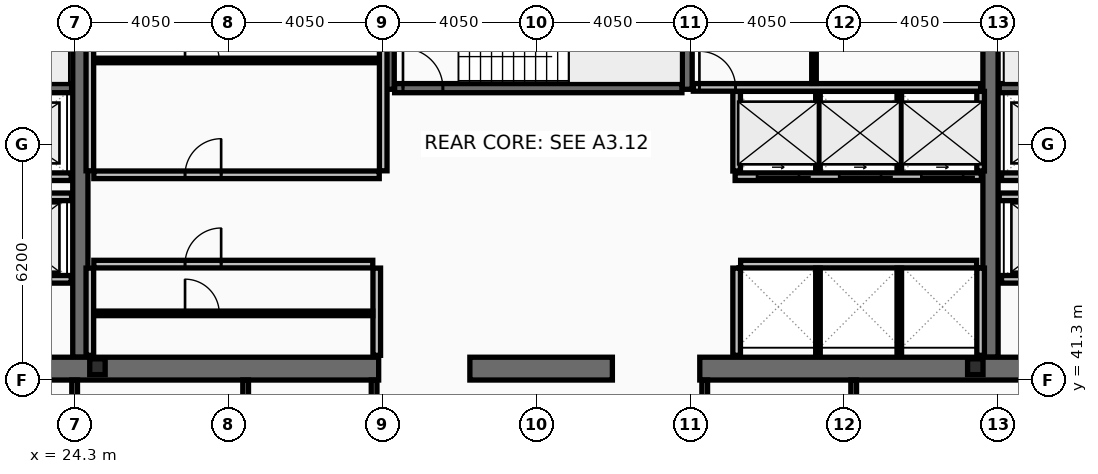
"""IFC4 building model, lengths in metres.
Left out: names, types, materials, properties, quantities, classifications, styles, units other than length and angle.
Written with IfcOpenShell. Run it as: python <this file> out.ifc"""

import sys

from ifc_helpers import new_model, si_unit, direction, frame, frame_2d, origin, origin_2d, place, context, subcontext, project, spatial, rectangle, i_section, extrude, element, fill, save


model = new_model("IFC4")
c1 = context("Model", 3, precision=1e-05, world=origin(), true_north=direction((0.0, 1.0)))
c2 = subcontext(c1, "Body", "Model", "MODEL_VIEW")
j1 = project(units=[si_unit("LENGTHUNIT", "METRE"), si_unit("PLANEANGLEUNIT", "RADIAN")], contexts=[c1])
p1 = place(None, origin())
s1 = spatial("IfcSite", under=j1, at=p1, CompositionType="ELEMENT")
p2 = place(p1, origin())
s2 = spatial("IfcBuilding", under=s1, at=p2, CompositionType="ELEMENT")
p3 = place(p2, frame((0.0, 0.0, 192.2)))
s3 = spatial("IfcBuildingStorey", under=s2, at=p3, CompositionType="ELEMENT", Elevation=192.2)
for number, where, z_axis, x_axis in (
    (1, (24.45, 41.9, 0.0), (0.0, 0.0, 1.0), (0.0, 1.0, 0.0)),
    (2, (48.4, 41.9, 0.0), (0.0, 0.0, 1.0), (0.0, 1.0, 0.0)),
):
    element("IfcWall", number, at=place(p3, frame(where, z_axis=z_axis, x_axis=x_axis)), inside=s3, PredefinedType="SHEAR", context=c2, shape_type="SweptSolid", body=[
        extrude(rectangle(XDim=11.2, YDim=0.4, at=frame_2d((5.6, 0.0))), origin(), (0.0, 0.0, 1.0), 3.44),
    ])
p4 = place(p3, frame((32.3, 41.6, 0.0), z_axis=(0.0, 0.0, 1.0), x_axis=(-1.0, 0.0, 0.0)))
e3 = element("IfcWall", 3, at=p4, inside=s3, PredefinedType="SHEAR", context=c2, shape_type="SweptSolid", body=[
    extrude(rectangle(XDim=11.45, YDim=0.6, at=frame_2d((5.725, 0.0))), origin(), (0.0, 0.0, 1.0), 3.44),
])
p5 = place(p3, frame((38.45, 41.6, 0.0), z_axis=(0.0, 0.0, 1.0), x_axis=(-1.0, 0.0, 0.0)))
e4 = element("IfcWall", 4, at=p5, inside=s3, PredefinedType="SHEAR", context=c2, shape_type="SweptSolid", body=[
    extrude(rectangle(XDim=3.75, YDim=0.6, at=frame_2d((1.875, 0.0))), origin(), (0.0, 0.0, 1.0), 3.44),
])
p6 = place(p3, frame((52.05, 41.6, 0.0), z_axis=(0.0, 0.0, 1.0), x_axis=(-1.0, 0.0, 0.0)))
e5 = element("IfcWall", 5, at=p6, inside=s3, PredefinedType="SHEAR", context=c2, shape_type="SweptSolid", body=[
    extrude(rectangle(XDim=11.3, YDim=0.6, at=frame_2d((5.65, 0.0))), origin(), (0.0, 0.0, 1.0), 3.44),
])
for number, where, z_axis, x_axis in (
    (6, (32.58, 48.95, 0.0), (0.0, 0.0, 1.0), (0.0, 1.0, 0.0)),
    (7, (40.42, 48.95, 0.0), (0.0, 0.0, 1.0), (0.0, 1.0, 0.0)),
):
    element("IfcWall", number, at=place(p3, frame(where, z_axis=z_axis, x_axis=x_axis)), inside=s3, PredefinedType="SHEAR", context=c2, shape_type="SweptSolid", body=[
        extrude(rectangle(XDim=4.15, YDim=0.26, at=frame_2d((2.075, 0.0))), origin(), (0.0, 0.0, 1.0), 3.44),
    ])
p7 = place(p3, frame((16.8, 48.98, 0.0), z_axis=(0.0, 0.0, 1.0), x_axis=(1.0, 0.0, 0.0)))
e8 = element("IfcWall", 8, at=p7, inside=s3, PredefinedType="SHEAR", context=c2, shape_type="SweptSolid", body=[
    extrude(rectangle(XDim=7.42, YDim=0.24, at=frame_2d((3.71, 0.0))), origin(), (0.0, 0.0, 1.0), 3.44),
])
p8 = place(p7, frame((0.22, 0.0, 0.0)))
e9 = element("IfcOpeningElement", 9, at=p8, cuts=e8, PredefinedType="OPENING", context=c2, shape_type="SweptSolid", body=[
    extrude(rectangle(XDim=1.05, YDim=2.15, at=frame_2d((0.525, 1.075))), frame((0.0, 0.13, 0.0), z_axis=(0.0, -1.0, 0.0), x_axis=(1.0, 0.0, 0.0)), (0.0, 0.0, 1.0), 0.26),
])
p9 = place(p3, frame((48.63, 48.98, 0.0), z_axis=(0.0, 0.0, 1.0), x_axis=(1.0, 0.0, 0.0)))
e10 = element("IfcWall", 10, at=p9, inside=s3, PredefinedType="SHEAR", context=c2, shape_type="SweptSolid", body=[
    extrude(rectangle(XDim=7.47, YDim=0.24, at=frame_2d((3.735, 0.0))), origin(), (0.0, 0.0, 1.0), 3.44),
])
p10 = place(p9, frame((6.2, 0.0, 0.0)))
e11 = element("IfcOpeningElement", 11, at=p10, cuts=e10, PredefinedType="OPENING", context=c2, shape_type="SweptSolid", body=[
    extrude(rectangle(XDim=1.05, YDim=2.15, at=frame_2d((0.525, 1.075))), frame((0.0, 0.13, 0.0), z_axis=(0.0, -1.0, 0.0), x_axis=(1.0, 0.0, 0.0)), (0.0, 0.0, 1.0), 0.26),
])
p11 = place(p3, frame((32.72, 48.98, 0.0), z_axis=(0.0, 0.0, 1.0), x_axis=(1.0, 0.0, 0.0)))
e12 = element("IfcWall", 12, at=p11, inside=s3, PredefinedType="SHEAR", context=c2, shape_type="SweptSolid", body=[
    extrude(rectangle(XDim=7.56, YDim=0.24, at=frame_2d((3.78, 0.0))), origin(), (0.0, 0.0, 1.0), 3.44),
])
p12 = place(p11, frame((0.22, 0.0, 0.0)))
e13 = element("IfcOpeningElement", 13, at=p12, cuts=e12, PredefinedType="OPENING", context=c2, shape_type="SweptSolid", body=[
    extrude(rectangle(XDim=1.05, YDim=2.15, at=frame_2d((0.525, 1.075))), frame((0.0, 0.13, 0.0), z_axis=(0.0, -1.0, 0.0), x_axis=(1.0, 0.0, 0.0)), (0.0, 0.0, 1.0), 0.26),
])
for number, where, z_axis, x_axis in (
    (14, (24.9, 41.65, 0.0), (0.0, 0.0, 1.0), (1.0, 0.0, 0.0)),
    (15, (48.0, 41.65, 0.0), (0.0, 0.0, 1.0), (1.0, 0.0, 0.0)),
):
    element("IfcColumn", number, at=place(p3, frame(where, z_axis=z_axis, x_axis=x_axis)), inside=s3, PredefinedType="COLUMN", context=c2, shape_type="SweptSolid", body=[
        extrude(i_section(OverallWidth=0.406, OverallDepth=0.416, WebThickness=0.03, FlangeThickness=0.048, at=origin_2d()), origin(), (0.0, 0.0, 1.0), 3.6),
    ])
p13 = place(p3, frame((51.61, 43.95, 0.0), z_axis=(0.0, 0.0, 1.0), x_axis=(-1.0, 0.0, 0.0)))
e16 = element("IfcWall", 16, at=p13, inside=s3, PredefinedType="PARTITIONING", context=c2, shape_type="SweptSolid", body=[
    extrude(rectangle(XDim=2.92, YDim=0.2, at=frame_2d((1.46, 0.0))), origin(), (0.0, 0.0, 1.0), 3.44),
])
p14 = place(p13, frame((0.81, 0.0, 0.0)))
e17 = element("IfcOpeningElement", 17, at=p14, cuts=e16, PredefinedType="OPENING", context=c2, shape_type="SweptSolid", body=[
    extrude(rectangle(XDim=1.3, YDim=2.18, at=frame_2d((0.65, 1.09))), frame((0.0, 0.11, 0.0), z_axis=(0.0, -1.0, 0.0), x_axis=(1.0, 0.0, 0.0)), (0.0, 0.0, 1.0), 0.22),
])
p15 = place(p3, frame((24.21, 43.95, 0.0), z_axis=(0.0, 0.0, 1.0), x_axis=(-1.0, 0.0, 0.0)))
e18 = element("IfcWall", 18, at=p15, inside=s3, PredefinedType="PARTITIONING", context=c2, shape_type="SweptSolid", body=[
    extrude(rectangle(XDim=2.97, YDim=0.2, at=frame_2d((1.485, 0.0))), origin(), (0.0, 0.0, 1.0), 3.44),
])
p16 = place(p15, frame((0.86, 0.0, 0.0)))
e19 = element("IfcOpeningElement", 19, at=p16, cuts=e18, PredefinedType="OPENING", context=c2, shape_type="SweptSolid", body=[
    extrude(rectangle(XDim=1.3, YDim=2.18, at=frame_2d((0.65, 1.09))), frame((0.0, 0.11, 0.0), z_axis=(0.0, -1.0, 0.0), x_axis=(1.0, 0.0, 0.0)), (0.0, 0.0, 1.0), 0.22),
])
p17 = place(p3, frame((51.61, 46.65, 0.0), z_axis=(0.0, 0.0, 1.0), x_axis=(-1.0, 0.0, 0.0)))
e20 = element("IfcWall", 20, at=p17, inside=s3, PredefinedType="PARTITIONING", context=c2, shape_type="SweptSolid", body=[
    extrude(rectangle(XDim=2.92, YDim=0.2, at=frame_2d((1.46, 0.0))), origin(), (0.0, 0.0, 1.0), 3.44),
])
p18 = place(p17, frame((0.86, 0.0, 0.0)))
e21 = element("IfcOpeningElement", 21, at=p18, cuts=e20, PredefinedType="OPENING", context=c2, shape_type="SweptSolid", body=[
    extrude(rectangle(XDim=1.2, YDim=2.18, at=frame_2d((0.6, 1.09))), frame((0.0, 0.11, 0.0), z_axis=(0.0, -1.0, 0.0), x_axis=(1.0, 0.0, 0.0)), (0.0, 0.0, 1.0), 0.22),
])
p19 = place(p3, frame((24.21, 46.65, 0.0), z_axis=(0.0, 0.0, 1.0), x_axis=(-1.0, 0.0, 0.0)))
e22 = element("IfcWall", 22, at=p19, inside=s3, PredefinedType="PARTITIONING", context=c2, shape_type="SweptSolid", body=[
    extrude(rectangle(XDim=2.97, YDim=0.2, at=frame_2d((1.485, 0.0))), origin(), (0.0, 0.0, 1.0), 3.44),
])
p20 = place(p19, frame((0.91, 0.0, 0.0)))
e23 = element("IfcOpeningElement", 23, at=p20, cuts=e22, PredefinedType="OPENING", context=c2, shape_type="SweptSolid", body=[
    extrude(rectangle(XDim=1.2, YDim=2.18, at=frame_2d((0.6, 1.09))), frame((0.0, 0.11, 0.0), z_axis=(0.0, -1.0, 0.0), x_axis=(1.0, 0.0, 0.0)), (0.0, 0.0, 1.0), 0.22),
])
p21 = place(p3, frame((48.16, 46.65, 0.0), z_axis=(0.0, 0.0, 1.0), x_axis=(-1.0, 0.0, 0.0)))
e24 = element("IfcWall", 24, at=p21, inside=s3, PredefinedType="PARTITIONING", context=c2, shape_type="SweptSolid", body=[
    extrude(rectangle(XDim=6.48, YDim=0.2, at=frame_2d((3.24, 0.0))), origin(), (0.0, 0.0, 1.0), 3.44),
])
p22 = place(p21, frame((4.8, 0.0, 0.0)))
e25 = element("IfcOpeningElement", 25, at=p22, cuts=e24, PredefinedType="OPENING", context=c2, shape_type="SweptSolid", body=[
    extrude(rectangle(XDim=1.1, YDim=2.18, at=frame_2d((0.55, 1.09))), frame((0.0, 0.11, 0.0), z_axis=(0.0, -1.0, 0.0), x_axis=(1.0, 0.0, 0.0)), (0.0, 0.0, 1.0), 0.22),
])
p23 = place(p21, frame((2.64, 0.0, 0.0)))
e26 = element("IfcOpeningElement", 26, at=p23, cuts=e24, PredefinedType="OPENING", context=c2, shape_type="SweptSolid", body=[
    extrude(rectangle(XDim=1.1, YDim=2.18, at=frame_2d((0.55, 1.09))), frame((0.0, 0.11, 0.0), z_axis=(0.0, -1.0, 0.0), x_axis=(1.0, 0.0, 0.0)), (0.0, 0.0, 1.0), 0.22),
])
p24 = place(p21, frame((0.48, 0.0, 0.0)))
e27 = element("IfcOpeningElement", 27, at=p24, cuts=e24, PredefinedType="OPENING", context=c2, shape_type="SweptSolid", body=[
    extrude(rectangle(XDim=1.1, YDim=2.18, at=frame_2d((0.55, 1.09))), frame((0.0, 0.11, 0.0), z_axis=(0.0, -1.0, 0.0), x_axis=(1.0, 0.0, 0.0)), (0.0, 0.0, 1.0), 0.22),
])
p25 = place(p3, frame((21.2, 46.12, 0.0), z_axis=(0.0, 0.0, 1.0), x_axis=(1.0, 0.0, 0.0)))
e28 = element("IfcWall", 28, at=p25, inside=s3, PredefinedType="PARTITIONING", context=c2, shape_type="SweptSolid", body=[
    extrude(rectangle(XDim=3.02, YDim=0.2, at=frame_2d((1.51, 0.0))), origin(), (0.0, 0.0, 1.0), 3.44),
])
p26 = place(p3, frame((48.63, 46.12, 0.0), z_axis=(0.0, 0.0, 1.0), x_axis=(1.0, 0.0, 0.0)))
e29 = element("IfcWall", 29, at=p26, inside=s3, PredefinedType="PARTITIONING", context=c2, shape_type="SweptSolid", body=[
    extrude(rectangle(XDim=3.07, YDim=0.2, at=frame_2d((1.535, 0.0))), origin(), (0.0, 0.0, 1.0), 3.44),
])
for number, where, z_axis, x_axis in (
    (30, (24.7, 46.805, 0.0), (0.0, 0.0, 1.0), (0.0, 1.0, 0.0)),
    (31, (32.42, 46.805, 0.0), (0.0, 0.0, 1.0), (0.0, 1.0, 0.0)),
):
    element("IfcWall", number, at=place(p3, frame(where, z_axis=z_axis, x_axis=x_axis)), inside=s3, PredefinedType="PARTITIONING", context=c2, shape_type="SweptSolid", body=[
        extrude(rectangle(XDim=5.99, YDim=0.2, at=frame_2d((2.995, 0.0))), origin(), (0.0, 0.0, 1.0), 3.44),
    ])
p27 = place(p3, frame((24.805, 49.709, 0.0), z_axis=(0.0, 0.0, 1.0), x_axis=(1.0, 0.0, 0.0)))
e32 = element("IfcWall", 32, at=p27, inside=s3, PredefinedType="PARTITIONING", context=c2, shape_type="SweptSolid", body=[
    extrude(rectangle(XDim=7.51, YDim=0.12, at=frame_2d((3.755, 0.0))), origin(), (0.0, 0.0, 1.0), 3.44),
])
p28 = place(p27, frame((2.4, 0.0, 0.0)))
e33 = element("IfcOpeningElement", 33, at=p28, cuts=e32, PredefinedType="OPENING", context=c2, shape_type="SweptSolid", body=[
    extrude(rectangle(XDim=0.9, YDim=2.05, at=frame_2d((0.45, 1.025))), frame((0.0, 0.07, 0.0), z_axis=(0.0, -1.0, 0.0), x_axis=(1.0, 0.0, 0.0)), (0.0, 0.0, 1.0), 0.14),
])
p29 = place(p3, frame((24.805, 46.7, 0.0), z_axis=(0.0, 0.0, 1.0), x_axis=(1.0, 0.0, 0.0)))
e34 = element("IfcWall", 34, at=p29, inside=s3, PredefinedType="PARTITIONING", context=c2, shape_type="SweptSolid", body=[
    extrude(rectangle(XDim=7.51, YDim=0.2, at=frame_2d((3.755, 0.0))), origin(), (0.0, 0.0, 1.0), 3.44),
])
p30 = place(p29, frame((2.4, 0.0, 0.0)))
e35 = element("IfcOpeningElement", 35, at=p30, cuts=e34, PredefinedType="OPENING", context=c2, shape_type="SweptSolid", body=[
    extrude(rectangle(XDim=0.95, YDim=2.1, at=frame_2d((0.475, 1.05))), frame((0.0, 0.11, 0.0), z_axis=(0.0, -1.0, 0.0), x_axis=(1.0, 0.0, 0.0)), (0.0, 0.0, 1.0), 0.22),
])
for number, where, z_axis, x_axis in (
    (36, (24.7, 41.95, 0.0), (0.0, 0.0, 1.0), (0.0, 1.0, 0.0)),
    (37, (32.25, 41.95, 0.0), (0.0, 0.0, 1.0), (0.0, 1.0, 0.0)),
):
    element("IfcWall", number, at=place(p3, frame(where, z_axis=z_axis, x_axis=x_axis)), inside=s3, PredefinedType="PARTITIONING", context=c2, shape_type="SweptSolid", body=[
        extrude(rectangle(XDim=2.295, YDim=0.2, at=frame_2d((1.147, 0.0))), origin(), (0.0, 0.0, 1.0), 3.44),
    ])
p31 = place(p3, frame((24.805, 43.054, 0.0), z_axis=(0.0, 0.0, 1.0), x_axis=(1.0, 0.0, 0.0)))
e38 = element("IfcWall", 38, at=p31, inside=s3, PredefinedType="PARTITIONING", context=c2, shape_type="SweptSolid", body=[
    extrude(rectangle(XDim=7.34, YDim=0.12, at=frame_2d((3.67, 0.0))), origin(), (0.0, 0.0, 1.0), 3.44),
])
p32 = place(p31, frame((2.4, 0.0, 0.0)))
e39 = element("IfcOpeningElement", 39, at=p32, cuts=e38, PredefinedType="OPENING", context=c2, shape_type="SweptSolid", body=[
    extrude(rectangle(XDim=0.9, YDim=2.05, at=frame_2d((0.45, 1.025))), frame((0.0, 0.07, 0.0), z_axis=(0.0, -1.0, 0.0), x_axis=(1.0, 0.0, 0.0)), (0.0, 0.0, 1.0), 0.14),
])
p33 = place(p3, frame((24.805, 44.35, 0.0), z_axis=(0.0, 0.0, 1.0), x_axis=(1.0, 0.0, 0.0)))
e40 = element("IfcWall", 40, at=p33, inside=s3, PredefinedType="PARTITIONING", context=c2, shape_type="SweptSolid", body=[
    extrude(rectangle(XDim=7.34, YDim=0.2, at=frame_2d((3.67, 0.0))), origin(), (0.0, 0.0, 1.0), 3.44),
])
p34 = place(p33, frame((2.4, 0.0, 0.0)))
e41 = element("IfcOpeningElement", 41, at=p34, cuts=e40, PredefinedType="OPENING", context=c2, shape_type="SweptSolid", body=[
    extrude(rectangle(XDim=0.95, YDim=2.1, at=frame_2d((0.475, 1.05))), frame((0.0, 0.11, 0.0), z_axis=(0.0, -1.0, 0.0), x_axis=(1.0, 0.0, 0.0)), (0.0, 0.0, 1.0), 0.22),
])
for number, where, z_axis, x_axis in (
    (42, (41.72, 46.8, 0.0), (0.0, 0.0, 1.0), (0.0, 1.0, 0.0)),
    (43, (48.14, 46.8, 0.0), (0.0, 0.0, 1.0), (0.0, 1.0, 0.0)),
):
    element("IfcWall", number, at=place(p3, frame(where, z_axis=z_axis, x_axis=x_axis)), inside=s3, PredefinedType="PARTITIONING", context=c2, shape_type="SweptSolid", body=[
        extrude(rectangle(XDim=2.095, YDim=0.2, at=frame_2d((1.047, 0.0))), origin(), (0.0, 0.0, 1.0), 3.44),
    ])
for number, where, z_axis, x_axis in (
    (44, (43.86, 46.8, 0.0), (0.0, 0.0, 1.0), (0.0, 1.0, 0.0)),
    (45, (46.0, 46.8, 0.0), (0.0, 0.0, 1.0), (0.0, 1.0, 0.0)),
):
    element("IfcWall", number, at=place(p3, frame(where, z_axis=z_axis, x_axis=x_axis)), inside=s3, PredefinedType="PARTITIONING", context=c2, shape_type="SweptSolid", body=[
        extrude(rectangle(XDim=2.095, YDim=0.12, at=frame_2d((1.047, 0.0))), origin(), (0.0, 0.0, 1.0), 3.44),
    ])
p35 = place(p3, frame((41.825, 44.35, 0.0), z_axis=(0.0, 0.0, 1.0), x_axis=(1.0, 0.0, 0.0)))
e46 = element("IfcWall", 46, at=p35, inside=s3, PredefinedType="PARTITIONING", context=c2, shape_type="SweptSolid", body=[
    extrude(rectangle(XDim=6.21, YDim=0.2, at=frame_2d((3.105, 0.0))), origin(), (0.0, 0.0, 1.0), 3.44),
])
for number, where, z_axis, x_axis in (
    (47, (41.72, 41.95, 0.0), (0.0, 0.0, 1.0), (0.0, 1.0, 0.0)),
    (48, (48.14, 41.95, 0.0), (0.0, 0.0, 1.0), (0.0, 1.0, 0.0)),
):
    element("IfcWall", number, at=place(p3, frame(where, z_axis=z_axis, x_axis=x_axis)), inside=s3, PredefinedType="PARTITIONING", context=c2, shape_type="SweptSolid", body=[
        extrude(rectangle(XDim=2.295, YDim=0.2, at=frame_2d((1.147, 0.0))), origin(), (0.0, 0.0, 1.0), 3.44),
    ])
for number, where, z_axis, x_axis in (
    (49, (43.86, 41.95, 0.0), (0.0, 0.0, 1.0), (0.0, 1.0, 0.0)),
    (50, (46.0, 41.95, 0.0), (0.0, 0.0, 1.0), (0.0, 1.0, 0.0)),
):
    element("IfcWall", number, at=place(p3, frame(where, z_axis=z_axis, x_axis=x_axis)), inside=s3, PredefinedType="PARTITIONING", context=c2, shape_type="SweptSolid", body=[
        extrude(rectangle(XDim=2.295, YDim=0.12, at=frame_2d((1.147, 0.0))), origin(), (0.0, 0.0, 1.0), 3.44),
    ])
p36 = place(p3, frame((40.58, 49.0, 0.0), z_axis=(0.0, 0.0, 1.0), x_axis=(1.0, 0.0, 0.0)))
e51 = element("IfcWall", 51, at=p36, inside=s3, PredefinedType="PARTITIONING", context=c2, shape_type="SweptSolid", body=[
    extrude(rectangle(XDim=7.56, YDim=0.2, at=frame_2d((3.78, 0.0))), origin(), (0.0, 0.0, 1.0), 3.44),
])
p37 = place(p36, frame((0.16, 0.0, 0.0)))
e52 = element("IfcOpeningElement", 52, at=p37, cuts=e51, PredefinedType="OPENING", context=c2, shape_type="SweptSolid", body=[
    extrude(rectangle(XDim=0.95, YDim=2.1, at=frame_2d((0.475, 1.05))), frame((0.0, 0.11, 0.0), z_axis=(0.0, -1.0, 0.0), x_axis=(1.0, 0.0, 0.0)), (0.0, 0.0, 1.0), 0.22),
])
p38 = place(p3, frame((43.755, 49.105, 0.0), z_axis=(0.0, 0.0, 1.0), x_axis=(0.0, 1.0, 0.0)))
e53 = element("IfcWall", 53, at=p38, inside=s3, PredefinedType="PARTITIONING", context=c2, shape_type="SweptSolid", body=[
    extrude(rectangle(XDim=3.69, YDim=0.12, at=frame_2d((1.845, 0.0))), origin(), (0.0, 0.0, 1.0), 3.44),
])
p39 = place(p38, frame((1.05, 0.0, 0.0)))
e54 = element("IfcOpeningElement", 54, at=p39, cuts=e53, PredefinedType="OPENING", context=c2, shape_type="SweptSolid", body=[
    extrude(rectangle(XDim=0.9, YDim=2.05, at=frame_2d((0.45, 1.025))), frame((0.0, 0.07, 0.0), z_axis=(0.0, -1.0, 0.0), x_axis=(1.0, 0.0, 0.0)), (0.0, 0.0, 1.0), 0.14),
])
for number, where, z_axis, x_axis in (
    (55, (24.3, 38.28, 0.0), (0.0, 0.0, 1.0), (0.0, 1.0, 0.0)),
    (56, (28.8, 38.28, 0.0), (0.0, 0.0, 1.0), (0.0, 1.0, 0.0)),
    (57, (32.18, 38.28, 0.0), (0.0, 0.0, 1.0), (0.0, 1.0, 0.0)),
    (58, (40.88, 38.28, 0.0), (0.0, 0.0, 1.0), (0.0, 1.0, 0.0)),
    (59, (44.8, 38.28, 0.0), (0.0, 0.0, 1.0), (0.0, 1.0, 0.0)),
):
    element("IfcWall", number, at=place(p3, frame(where, z_axis=z_axis, x_axis=x_axis)), inside=s3, PredefinedType="PARTITIONING", context=c2, shape_type="SweptSolid", body=[
        extrude(rectangle(XDim=3.02, YDim=0.15, at=frame_2d((1.51, 0.0))), origin(), (0.0, 0.0, 1.0), 3.44),
    ])
p40 = place(p12, origin())
e60 = element("IfcDoor", 60, at=p40, inside=s3, OperationType="SINGLE_SWING_LEFT", PredefinedType="DOOR", context=c2, shape_type="SweptSolid", body=[
    extrude(rectangle(XDim=1.05, YDim=2.15, at=frame_2d((0.525, 1.075))), frame((0.0, 0.025, 0.0), z_axis=(0.0, -1.0, 0.0), x_axis=(1.0, 0.0, 0.0)), (0.0, 0.0, 1.0), 0.05),
])
fill(e13, e60)
p41 = place(p22, origin())
e61 = element("IfcDoor", 61, at=p41, inside=s3, OperationType="SLIDING_TO_LEFT", PredefinedType="DOOR", context=c2, shape_type="SweptSolid", body=[
    extrude(rectangle(XDim=1.1, YDim=2.18, at=frame_2d((0.55, 1.09))), frame((0.0, 0.025, 0.0), z_axis=(0.0, -1.0, 0.0), x_axis=(1.0, 0.0, 0.0)), (0.0, 0.0, 1.0), 0.05),
])
fill(e25, e61)
p42 = place(p23, origin())
e62 = element("IfcDoor", 62, at=p42, inside=s3, OperationType="SLIDING_TO_LEFT", PredefinedType="DOOR", context=c2, shape_type="SweptSolid", body=[
    extrude(rectangle(XDim=1.1, YDim=2.18, at=frame_2d((0.55, 1.09))), frame((0.0, 0.025, 0.0), z_axis=(0.0, -1.0, 0.0), x_axis=(1.0, 0.0, 0.0)), (0.0, 0.0, 1.0), 0.05),
])
fill(e26, e62)
p43 = place(p24, origin())
e63 = element("IfcDoor", 63, at=p43, inside=s3, OperationType="SLIDING_TO_LEFT", PredefinedType="DOOR", context=c2, shape_type="SweptSolid", body=[
    extrude(rectangle(XDim=1.1, YDim=2.18, at=frame_2d((0.55, 1.09))), frame((0.0, 0.025, 0.0), z_axis=(0.0, -1.0, 0.0), x_axis=(1.0, 0.0, 0.0)), (0.0, 0.0, 1.0), 0.05),
])
fill(e27, e63)
p44 = place(p28, origin())
e64 = element("IfcDoor", 64, at=p44, inside=s3, OperationType="SINGLE_SWING_LEFT", PredefinedType="DOOR", context=c2, shape_type="SweptSolid", body=[
    extrude(rectangle(XDim=0.9, YDim=2.05, at=frame_2d((0.45, 1.025))), frame((0.0, 0.025, 0.0), z_axis=(0.0, -1.0, 0.0), x_axis=(1.0, 0.0, 0.0)), (0.0, 0.0, 1.0), 0.05),
])
fill(e33, e64)
p45 = place(p30, origin())
e65 = element("IfcDoor", 65, at=p45, inside=s3, OperationType="SINGLE_SWING_RIGHT", PredefinedType="DOOR", context=c2, shape_type="SweptSolid", body=[
    extrude(rectangle(XDim=0.95, YDim=2.1, at=frame_2d((0.475, 1.05))), frame((0.0, 0.025, 0.0), z_axis=(0.0, -1.0, 0.0), x_axis=(1.0, 0.0, 0.0)), (0.0, 0.0, 1.0), 0.05),
])
fill(e35, e65)
p46 = place(p32, origin())
e66 = element("IfcDoor", 66, at=p46, inside=s3, OperationType="SINGLE_SWING_LEFT", PredefinedType="DOOR", context=c2, shape_type="SweptSolid", body=[
    extrude(rectangle(XDim=0.9, YDim=2.05, at=frame_2d((0.45, 1.025))), frame((0.0, 0.025, 0.0), z_axis=(0.0, -1.0, 0.0), x_axis=(1.0, 0.0, 0.0)), (0.0, 0.0, 1.0), 0.05),
])
fill(e39, e66)
p47 = place(p34, origin())
e67 = element("IfcDoor", 67, at=p47, inside=s3, OperationType="SINGLE_SWING_RIGHT", PredefinedType="DOOR", context=c2, shape_type="SweptSolid", body=[
    extrude(rectangle(XDim=0.95, YDim=2.1, at=frame_2d((0.475, 1.05))), frame((0.0, 0.025, 0.0), z_axis=(0.0, -1.0, 0.0), x_axis=(1.0, 0.0, 0.0)), (0.0, 0.0, 1.0), 0.05),
])
fill(e41, e67)
p48 = place(p37, origin())
e68 = element("IfcDoor", 68, at=p48, inside=s3, OperationType="SINGLE_SWING_LEFT", PredefinedType="DOOR", context=c2, shape_type="SweptSolid", body=[
    extrude(rectangle(XDim=0.95, YDim=2.1, at=frame_2d((0.475, 1.05))), frame((0.0, 0.025, 0.0), z_axis=(0.0, -1.0, 0.0), x_axis=(1.0, 0.0, 0.0)), (0.0, 0.0, 1.0), 0.05),
])
fill(e52, e68)
save(model, sys.argv[1])
